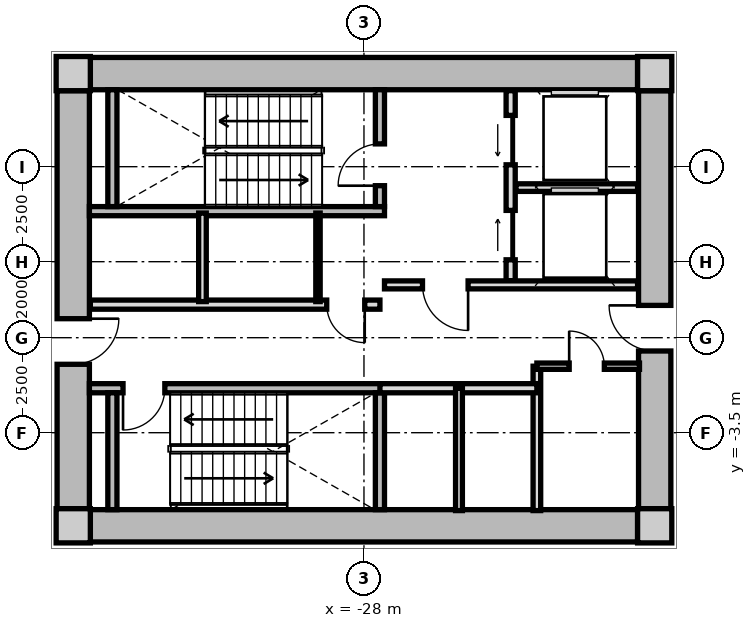
"""IFC4 building model, lengths in metres.
Left out: names, types, materials, properties, quantities, classifications, styles, units other than length and angle.
Written with IfcOpenShell. Run it as: python <this file> out.ifc"""

import sys

from ifc_helpers import new_model, si_unit, direction, frame, frame_2d, origin, origin_2d, place, context, subcontext, project, spatial, rectangle, extrude, source, transform, mapped, element, fill, save


model = new_model("IFC4")
c1 = context("Model", 3, precision=1e-05, world=origin(), true_north=direction((0.0, 1.0)))
c2 = subcontext(c1, "Body", "Model", "MODEL_VIEW")
j1 = project(units=[si_unit("LENGTHUNIT", "METRE"), si_unit("PLANEANGLEUNIT", "RADIAN")], contexts=[c1])
p1 = place(None, origin())
s1 = spatial("IfcSite", under=j1, at=p1, CompositionType="ELEMENT")
p2 = place(p1, origin())
s2 = spatial("IfcBuilding", under=s1, at=p2, CompositionType="ELEMENT")
p3 = place(p2, frame((0.0, 0.0, -4.2)))
s3 = spatial("IfcBuildingStorey", under=s2, at=p3, CompositionType="ELEMENT", Elevation=-4.2)
m1 = source(origin(), c2, "Body", "SweptSolid", [
    extrude(rectangle(XDim=0.9, YDim=0.9, at=origin_2d()), origin(), (0.0, 0.0, 1.0), 4.2),
])
for number, where, z_axis, x_axis in (
    (1, (-35.65, -5.95, 0.0), (0.0, 0.0, 1.0), (1.0, 0.0, 0.0)),
    (2, (-20.35, -5.95, 0.0), (0.0, 0.0, 1.0), (1.0, 0.0, 0.0)),
    (3, (-20.35, 5.95, 0.0), (0.0, 0.0, 1.0), (1.0, 0.0, 0.0)),
    (4, (-35.65, 5.95, 0.0), (0.0, 0.0, 1.0), (1.0, 0.0, 0.0)),
):
    element("IfcColumn", number, at=place(p3, frame(where, z_axis=z_axis, x_axis=x_axis)), inside=s3, PredefinedType="COLUMN", context=c2, shape_type="MappedRepresentation", body=[
        mapped(m1, transform((0.0, 0.0, 0.0), x_axis=(1.0, 0.0, 0.0), y_axis=(0.0, 1.0, 0.0), z_axis=(0.0, 0.0, 1.0), scale=1.0)),
    ])
m2 = source(origin(), c2, "Body", "SweptSolid", [
    extrude(rectangle(XDim=14.4, YDim=0.85, at=frame_2d((7.2, 0.0))), origin(), (0.0, 0.0, 1.0), 3.88),
])
for number, where, z_axis, x_axis in (
    (5, (-35.2, 5.95, 0.0), (0.0, 0.0, 1.0), (1.0, 0.0, 0.0)),
    (6, (-20.8, -5.95, 0.0), (0.0, 0.0, 1.0), (-1.0, 0.0, 0.0)),
):
    element("IfcWall", number, at=place(p3, frame(where, z_axis=z_axis, x_axis=x_axis)), inside=s3, PredefinedType="SHEAR", context=c2, shape_type="MappedRepresentation", body=[
        mapped(m2, transform((0.0, 0.0, 0.0), x_axis=(1.0, 0.0, 0.0), y_axis=(0.0, 1.0, 0.0), z_axis=(0.0, 0.0, 1.0), scale=1.0)),
    ])
m3 = source(origin(), c2, "Body", "SweptSolid", [
    extrude(rectangle(XDim=11.0, YDim=0.85, at=frame_2d((5.5, 0.0))), origin(), (0.0, 0.0, 1.0), 3.88),
])
p4 = place(p3, frame((-35.65, -5.5, 0.0), z_axis=(0.0, 0.0, 1.0), x_axis=(0.0, 1.0, 0.0)))
e7 = element("IfcWall", 7, at=p4, inside=s3, PredefinedType="SHEAR", context=c2, shape_type="MappedRepresentation", body=[
    mapped(m3, transform((0.0, 0.0, 0.0), x_axis=(1.0, 0.0, 0.0), y_axis=(0.0, 1.0, 0.0), z_axis=(0.0, 0.0, 1.0), scale=1.0)),
])
p5 = place(p4, frame((3.8, 0.0, 0.0)))
e8 = element("IfcOpeningElement", 8, at=p5, cuts=e7, PredefinedType="OPENING", context=c2, shape_type="SweptSolid", body=[
    extrude(rectangle(XDim=1.2, YDim=2.15, at=frame_2d((0.6, 1.075))), frame((0.0, 0.435, 0.0), z_axis=(0.0, -1.0, 0.0), x_axis=(1.0, 0.0, 0.0)), (0.0, 0.0, 1.0), 0.87),
])
p6 = place(p3, frame((-20.35, 5.5, 0.0), z_axis=(0.0, 0.0, 1.0), x_axis=(0.0, -1.0, 0.0)))
e9 = element("IfcWall", 9, at=p6, inside=s3, PredefinedType="SHEAR", context=c2, shape_type="MappedRepresentation", body=[
    mapped(m3, transform((0.0, 0.0, 0.0), x_axis=(1.0, 0.0, 0.0), y_axis=(0.0, 1.0, 0.0), z_axis=(0.0, 0.0, 1.0), scale=1.0)),
])
p7 = place(p6, frame((5.65, 0.0, 0.0)))
e10 = element("IfcOpeningElement", 10, at=p7, cuts=e9, PredefinedType="OPENING", context=c2, shape_type="SweptSolid", body=[
    extrude(rectangle(XDim=1.2, YDim=2.15, at=frame_2d((0.6, 1.075))), frame((0.0, 0.435, 0.0), z_axis=(0.0, -1.0, 0.0), x_axis=(1.0, 0.0, 0.0)), (0.0, 0.0, 1.0), 0.87),
])
m4 = source(origin(), c2, "Body", "SweptSolid", [
    extrude(rectangle(XDim=7.765, YDim=0.24, at=frame_2d((3.883, 0.0))), origin(), (0.0, 0.0, 1.0), 3.88),
])
p8 = place(p3, frame((-35.225, 2.33, 0.0), z_axis=(0.0, 0.0, 1.0), x_axis=(1.0, 0.0, 0.0)))
e11 = element("IfcWall", 11, at=p8, inside=s3, PredefinedType="PARTITIONING", context=c2, shape_type="MappedRepresentation", body=[
    mapped(m4, transform((0.0, 0.0, 0.0), x_axis=(1.0, 0.0, 0.0), y_axis=(0.0, 1.0, 0.0), z_axis=(0.0, 0.0, 1.0), scale=1.0)),
])
m5 = source(origin(), c2, "Body", "SweptSolid", [
    extrude(rectangle(XDim=3.075, YDim=0.24, at=frame_2d((1.538, 0.0))), origin(), (0.0, 0.0, 1.0), 3.88),
])
p9 = place(p3, frame((-34.62, 2.45, 0.0), z_axis=(0.0, 0.0, 1.0), x_axis=(0.0, 1.0, 0.0)))
e12 = element("IfcWall", 12, at=p9, inside=s3, PredefinedType="PARTITIONING", context=c2, shape_type="MappedRepresentation", body=[
    mapped(m5, transform((0.0, 0.0, 0.0), x_axis=(1.0, 0.0, 0.0), y_axis=(0.0, 1.0, 0.0), z_axis=(0.0, 0.0, 1.0), scale=1.0)),
])
p10 = place(p3, frame((-27.58, 2.45, 0.0), z_axis=(0.0, 0.0, 1.0), x_axis=(0.0, 1.0, 0.0)))
e13 = element("IfcWall", 13, at=p10, inside=s3, PredefinedType="PARTITIONING", context=c2, shape_type="MappedRepresentation", body=[
    mapped(m5, transform((0.0, 0.0, 0.0), x_axis=(1.0, 0.0, 0.0), y_axis=(0.0, 1.0, 0.0), z_axis=(0.0, 0.0, 1.0), scale=1.0)),
])
p11 = place(p10, frame((0.55, 0.0, 0.0)))
e14 = element("IfcOpeningElement", 14, at=p11, cuts=e13, PredefinedType="OPENING", context=c2, shape_type="SweptSolid", body=[
    extrude(rectangle(XDim=1.1, YDim=2.15, at=frame_2d((0.55, 1.075))), frame((0.0, 0.13, 0.0), z_axis=(0.0, -1.0, 0.0), x_axis=(1.0, 0.0, 0.0)), (0.0, 0.0, 1.0), 0.26),
])
p12 = place(p3, frame((-35.225, -2.33, 0.0), z_axis=(0.0, 0.0, 1.0), x_axis=(1.0, 0.0, 0.0)))
e15 = element("IfcWall", 15, at=p12, inside=s3, PredefinedType="PARTITIONING", context=c2, shape_type="MappedRepresentation", body=[
    mapped(m4, transform((0.0, 0.0, 0.0), x_axis=(1.0, 0.0, 0.0), y_axis=(0.0, 1.0, 0.0), z_axis=(0.0, 0.0, 1.0), scale=1.0)),
])
p13 = place(p12, frame((0.885, 0.0, 0.0)))
e16 = element("IfcOpeningElement", 16, at=p13, cuts=e15, PredefinedType="OPENING", context=c2, shape_type="SweptSolid", body=[
    extrude(rectangle(XDim=1.1, YDim=2.15, at=frame_2d((0.55, 1.075))), frame((0.0, 0.13, 0.0), z_axis=(0.0, -1.0, 0.0), x_axis=(1.0, 0.0, 0.0)), (0.0, 0.0, 1.0), 0.26),
])
for number, where, z_axis, x_axis in (
    (17, (-34.62, -5.525, 0.0), (0.0, 0.0, 1.0), (0.0, 1.0, 0.0)),
    (18, (-27.58, -5.525, 0.0), (0.0, 0.0, 1.0), (0.0, 1.0, 0.0)),
):
    element("IfcWall", number, at=place(p3, frame(where, z_axis=z_axis, x_axis=x_axis)), inside=s3, PredefinedType="PARTITIONING", context=c2, shape_type="MappedRepresentation", body=[
        mapped(m5, transform((0.0, 0.0, 0.0), x_axis=(1.0, 0.0, 0.0), y_axis=(0.0, 1.0, 0.0), z_axis=(0.0, 0.0, 1.0), scale=1.0)),
    ])
m6 = source(origin(), c2, "Body", "SweptSolid", [
    extrude(rectangle(XDim=5.0, YDim=0.24, at=frame_2d((2.5, 0.0))), origin(), (0.0, 0.0, 1.0), 3.865),
])
p14 = place(p3, frame((-24.14, 0.5, 0.0), z_axis=(0.0, 0.0, 1.0), x_axis=(0.0, 1.0, 0.0)))
e19 = element("IfcWall", 19, at=p14, inside=s3, PredefinedType="PARTITIONING", context=c2, shape_type="MappedRepresentation", body=[
    mapped(m6, transform((0.0, 0.0, 0.0), x_axis=(1.0, 0.0, 0.0), y_axis=(0.0, 1.0, 0.0), z_axis=(0.0, 0.0, 1.0), scale=1.0)),
])
p15 = place(p14, frame((3.05, 0.0, 0.0)))
e20 = element("IfcOpeningElement", 20, at=p15, cuts=e19, PredefinedType="OPENING", context=c2, shape_type="SweptSolid", body=[
    extrude(rectangle(XDim=1.3, YDim=2.2, at=frame_2d((0.65, 1.1))), frame((0.0, 0.13, 0.0), z_axis=(0.0, -1.0, 0.0), x_axis=(1.0, 0.0, 0.0)), (0.0, 0.0, 1.0), 0.26),
])
p16 = place(p14, frame((0.55, 0.0, 0.0)))
e21 = element("IfcOpeningElement", 21, at=p16, cuts=e19, PredefinedType="OPENING", context=c2, shape_type="SweptSolid", body=[
    extrude(rectangle(XDim=1.3, YDim=2.2, at=frame_2d((0.65, 1.1))), frame((0.0, 0.13, 0.0), z_axis=(0.0, -1.0, 0.0), x_axis=(1.0, 0.0, 0.0)), (0.0, 0.0, 1.0), 0.26),
])
m7 = source(origin(), c2, "Body", "SweptSolid", [
    extrude(rectangle(XDim=3.2, YDim=0.2, at=frame_2d((1.6, 0.0))), origin(), (0.0, 0.0, 1.0), 3.865),
])
p17 = place(p3, frame((-24.0, 2.95, 0.0), z_axis=(0.0, 0.0, 1.0), x_axis=(1.0, 0.0, 0.0)))
e22 = element("IfcWall", 22, at=p17, inside=s3, PredefinedType="PARTITIONING", context=c2, shape_type="MappedRepresentation", body=[
    mapped(m7, transform((0.0, 0.0, 0.0), x_axis=(1.0, 0.0, 0.0), y_axis=(0.0, 1.0, 0.0), z_axis=(0.0, 0.0, 1.0), scale=1.0)),
])
m8 = source(origin(), c2, "Body", "SweptSolid", [
    extrude(rectangle(XDim=6.66, YDim=0.21, at=frame_2d((3.33, 0.0))), origin(), (0.0, 0.0, 1.0), 3.865),
])
p18 = place(p3, frame((-27.46, 0.39, 0.0), z_axis=(0.0, 0.0, 1.0), x_axis=(1.0, 0.0, 0.0)))
e23 = element("IfcWall", 23, at=p18, inside=s3, PredefinedType="PARTITIONING", context=c2, shape_type="MappedRepresentation", body=[
    mapped(m8, transform((0.0, 0.0, 0.0), x_axis=(1.0, 0.0, 0.0), y_axis=(0.0, 1.0, 0.0), z_axis=(0.0, 0.0, 1.0), scale=1.0)),
])
p19 = place(p18, frame((1.0, 0.0, 0.0)))
e24 = element("IfcOpeningElement", 24, at=p19, cuts=e23, PredefinedType="OPENING", context=c2, shape_type="SweptSolid", body=[
    extrude(rectangle(XDim=1.2, YDim=2.15, at=frame_2d((0.6, 1.075))), frame((0.0, 0.115, 0.0), z_axis=(0.0, -1.0, 0.0), x_axis=(1.0, 0.0, 0.0)), (0.0, 0.0, 1.0), 0.23),
])
m9 = source(origin(), c2, "Body", "SweptSolid", [
    extrude(rectangle(XDim=7.62, YDim=0.24, at=frame_2d((3.81, 0.0))), origin(), (0.0, 0.0, 1.0), 3.865),
])
p20 = place(p3, frame((-35.2, -0.13, 0.0), z_axis=(0.0, 0.0, 1.0), x_axis=(1.0, 0.0, 0.0)))
e25 = element("IfcWall", 25, at=p20, inside=s3, PredefinedType="PARTITIONING", context=c2, shape_type="MappedRepresentation", body=[
    mapped(m9, transform((0.0, 0.0, 0.0), x_axis=(1.0, 0.0, 0.0), y_axis=(0.0, 1.0, 0.0), z_axis=(0.0, 0.0, 1.0), scale=1.0)),
])
p21 = place(p20, frame((6.22, 0.0, 0.0)))
e26 = element("IfcOpeningElement", 26, at=p21, cuts=e25, PredefinedType="OPENING", context=c2, shape_type="SweptSolid", body=[
    extrude(rectangle(XDim=1.0, YDim=2.1, at=frame_2d((0.5, 1.05))), frame((0.0, 0.13, 0.0), z_axis=(0.0, -1.0, 0.0), x_axis=(1.0, 0.0, 0.0)), (0.0, 0.0, 1.0), 0.26),
])
m10 = source(origin(), c2, "Body", "SweptSolid", [
    extrude(rectangle(XDim=2.33, YDim=0.115, at=frame_2d((1.165, 0.0))), origin(), (0.0, 0.0, 1.0), 3.865),
])
p22 = place(p3, frame((-29.21, -0.05, 0.0), z_axis=(0.0, 0.0, 1.0), x_axis=(0.0, 1.0, 0.0)))
e27 = element("IfcWall", 27, at=p22, inside=s3, PredefinedType="PARTITIONING", context=c2, shape_type="MappedRepresentation", body=[
    mapped(m10, transform((0.0, 0.0, 0.0), x_axis=(1.0, 0.0, 0.0), y_axis=(0.0, 1.0, 0.0), z_axis=(0.0, 0.0, 1.0), scale=1.0)),
])
m11 = source(origin(), c2, "Body", "SweptSolid", [
    extrude(rectangle(XDim=2.33, YDim=0.2, at=frame_2d((1.165, 0.0))), origin(), (0.0, 0.0, 1.0), 3.865),
])
p23 = place(p3, frame((-32.25, -0.05, 0.0), z_axis=(0.0, 0.0, 1.0), x_axis=(0.0, 1.0, 0.0)))
e28 = element("IfcWall", 28, at=p23, inside=s3, PredefinedType="PARTITIONING", context=c2, shape_type="MappedRepresentation", body=[
    mapped(m11, transform((0.0, 0.0, 0.0), x_axis=(1.0, 0.0, 0.0), y_axis=(0.0, 1.0, 0.0), z_axis=(0.0, 0.0, 1.0), scale=1.0)),
])
m12 = source(origin(), c2, "Body", "SweptSolid", [
    extrude(rectangle(XDim=3.8, YDim=0.2, at=frame_2d((1.9, 0.0))), origin(), (0.0, 0.0, 1.0), 3.865),
])
p24 = place(p3, frame((-23.45, -5.55, 0.0), z_axis=(0.0, 0.0, 1.0), x_axis=(0.0, 1.0, 0.0)))
e29 = element("IfcWall", 29, at=p24, inside=s3, PredefinedType="PARTITIONING", context=c2, shape_type="MappedRepresentation", body=[
    mapped(m12, transform((0.0, 0.0, 0.0), x_axis=(1.0, 0.0, 0.0), y_axis=(0.0, 1.0, 0.0), z_axis=(0.0, 0.0, 1.0), scale=1.0)),
])
m13 = source(origin(), c2, "Body", "SweptSolid", [
    extrude(rectangle(XDim=4.13, YDim=0.24, at=frame_2d((2.065, 0.0))), origin(), (0.0, 0.0, 1.0), 3.865),
])
p25 = place(p3, frame((-27.58, -2.33, 0.0), z_axis=(0.0, 0.0, 1.0), x_axis=(1.0, 0.0, 0.0)))
e30 = element("IfcWall", 30, at=p25, inside=s3, PredefinedType="PARTITIONING", context=c2, shape_type="MappedRepresentation", body=[
    mapped(m13, transform((0.0, 0.0, 0.0), x_axis=(1.0, 0.0, 0.0), y_axis=(0.0, 1.0, 0.0), z_axis=(0.0, 0.0, 1.0), scale=1.0)),
])
m14 = source(origin(), c2, "Body", "SweptSolid", [
    extrude(rectangle(XDim=3.22, YDim=0.18, at=frame_2d((1.61, 0.0))), origin(), (0.0, 0.0, 1.0), 3.865),
])
p26 = place(p3, frame((-25.5, -5.55, 0.0), z_axis=(0.0, 0.0, 1.0), x_axis=(0.0, 1.0, 0.0)))
e31 = element("IfcWall", 31, at=p26, inside=s3, PredefinedType="PARTITIONING", context=c2, shape_type="MappedRepresentation", body=[
    mapped(m14, transform((0.0, 0.0, 0.0), x_axis=(1.0, 0.0, 0.0), y_axis=(0.0, 1.0, 0.0), z_axis=(0.0, 0.0, 1.0), scale=1.0)),
])
m15 = source(origin(), c2, "Body", "SweptSolid", [
    extrude(rectangle(XDim=2.7, YDim=0.165, at=frame_2d((1.35, 0.0))), origin(), (0.0, 0.0, 1.0), 3.865),
])
p27 = place(p3, frame((-23.45, -1.75, 0.0), z_axis=(0.0, 0.0, 1.0), x_axis=(1.0, 0.0, 0.0)))
e32 = element("IfcWall", 32, at=p27, inside=s3, PredefinedType="PARTITIONING", context=c2, shape_type="MappedRepresentation", body=[
    mapped(m15, transform((0.0, 0.0, 0.0), x_axis=(1.0, 0.0, 0.0), y_axis=(0.0, 1.0, 0.0), z_axis=(0.0, 0.0, 1.0), scale=1.0)),
])
p28 = place(p27, frame((0.85, 0.0, 0.0)))
e33 = element("IfcOpeningElement", 33, at=p28, cuts=e32, PredefinedType="OPENING", context=c2, shape_type="SweptSolid", body=[
    extrude(rectangle(XDim=0.925, YDim=2.1, at=frame_2d((0.462, 1.05))), frame((0.0, 0.093, 0.0), z_axis=(0.0, -1.0, 0.0), x_axis=(1.0, 0.0, 0.0)), (0.0, 0.0, 1.0), 0.185),
])
m16 = source(origin(), c2, "Body", "SweptSolid", [
    extrude(rectangle(XDim=1.1, YDim=2.15, at=frame_2d((0.55, 1.075))), frame((0.0, 0.025, 0.0), z_axis=(0.0, -1.0, 0.0), x_axis=(1.0, 0.0, 0.0)), (0.0, 0.0, 1.0), 0.05),
])
p29 = place(p11, origin())
e34 = element("IfcDoor", 34, at=p29, inside=s3, OperationType="SINGLE_SWING_LEFT", PredefinedType="DOOR", context=c2, shape_type="MappedRepresentation", body=[
    mapped(m16, transform((0.0, 0.0, 0.0), x_axis=(1.0, 0.0, 0.0), y_axis=(0.0, 1.0, 0.0), z_axis=(0.0, 0.0, 1.0), scale=1.0)),
])
fill(e14, e34)
p30 = place(p13, frame((1.1, 0.0, 0.0), z_axis=(0.0, 0.0, 1.0), x_axis=(-1.0, 0.0, 0.0)))
e35 = element("IfcDoor", 35, at=p30, inside=s3, OperationType="SINGLE_SWING_RIGHT", PredefinedType="DOOR", context=c2, shape_type="MappedRepresentation", body=[
    mapped(m16, transform((0.0, 0.0, 0.0), x_axis=(1.0, 0.0, 0.0), y_axis=(0.0, 1.0, 0.0), z_axis=(0.0, 0.0, 1.0), scale=1.0)),
])
fill(e16, e35)
m17 = source(origin(), c2, "Body", "SweptSolid", [
    extrude(rectangle(XDim=1.3, YDim=2.2, at=frame_2d((0.65, 1.1))), frame((0.0, 0.025, 0.0), z_axis=(0.0, -1.0, 0.0), x_axis=(1.0, 0.0, 0.0)), (0.0, 0.0, 1.0), 0.05),
])
p31 = place(p15, origin())
e36 = element("IfcDoor", 36, at=p31, inside=s3, OperationType="SLIDING_TO_LEFT", PredefinedType="DOOR", context=c2, shape_type="MappedRepresentation", body=[
    mapped(m17, transform((0.0, 0.0, 0.0), x_axis=(1.0, 0.0, 0.0), y_axis=(0.0, 1.0, 0.0), z_axis=(0.0, 0.0, 1.0), scale=1.0)),
])
fill(e20, e36)
p32 = place(p16, origin())
e37 = element("IfcDoor", 37, at=p32, inside=s3, OperationType="SLIDING_TO_RIGHT", PredefinedType="DOOR", context=c2, shape_type="MappedRepresentation", body=[
    mapped(m17, transform((0.0, 0.0, 0.0), x_axis=(1.0, 0.0, 0.0), y_axis=(0.0, 1.0, 0.0), z_axis=(0.0, 0.0, 1.0), scale=1.0)),
])
fill(e21, e37)
m18 = source(origin(), c2, "Body", "SweptSolid", [
    extrude(rectangle(XDim=1.2, YDim=2.15, at=frame_2d((0.6, 1.075))), frame((0.0, 0.025, 0.0), z_axis=(0.0, -1.0, 0.0), x_axis=(1.0, 0.0, 0.0)), (0.0, 0.0, 1.0), 0.05),
])
p33 = place(p19, frame((1.2, 0.0, 0.0), z_axis=(0.0, 0.0, 1.0), x_axis=(-1.0, 0.0, 0.0)))
e38 = element("IfcDoor", 38, at=p33, inside=s3, OperationType="SINGLE_SWING_LEFT", PredefinedType="DOOR", context=c2, shape_type="MappedRepresentation", body=[
    mapped(m18, transform((0.0, 0.0, 0.0), x_axis=(1.0, 0.0, 0.0), y_axis=(0.0, 1.0, 0.0), z_axis=(0.0, 0.0, 1.0), scale=1.0)),
])
fill(e24, e38)
p34 = place(p5, frame((1.2, 0.0, 0.0), z_axis=(0.0, 0.0, 1.0), x_axis=(-1.0, 0.0, 0.0)))
e39 = element("IfcDoor", 39, at=p34, inside=s3, OperationType="SINGLE_SWING_LEFT", PredefinedType="DOOR", context=c2, shape_type="MappedRepresentation", body=[
    mapped(m18, transform((0.0, 0.0, 0.0), x_axis=(1.0, 0.0, 0.0), y_axis=(0.0, 1.0, 0.0), z_axis=(0.0, 0.0, 1.0), scale=1.0)),
])
fill(e8, e39)
p35 = place(p7, frame((1.2, 0.0, 0.0), z_axis=(0.0, 0.0, 1.0), x_axis=(-1.0, 0.0, 0.0)))
e40 = element("IfcDoor", 40, at=p35, inside=s3, OperationType="SINGLE_SWING_RIGHT", PredefinedType="DOOR", context=c2, shape_type="MappedRepresentation", body=[
    mapped(m18, transform((0.0, 0.0, 0.0), x_axis=(1.0, 0.0, 0.0), y_axis=(0.0, 1.0, 0.0), z_axis=(0.0, 0.0, 1.0), scale=1.0)),
])
fill(e10, e40)
m19 = source(origin(), c2, "Body", "SweptSolid", [
    extrude(rectangle(XDim=1.0, YDim=2.1, at=frame_2d((0.5, 1.05))), frame((0.0, 0.025, 0.0), z_axis=(0.0, -1.0, 0.0), x_axis=(1.0, 0.0, 0.0)), (0.0, 0.0, 1.0), 0.05),
])
p36 = place(p21, frame((1.0, 0.0, 0.0), z_axis=(0.0, 0.0, 1.0), x_axis=(-1.0, 0.0, 0.0)))
e41 = element("IfcDoor", 41, at=p36, inside=s3, OperationType="SINGLE_SWING_LEFT", PredefinedType="DOOR", context=c2, shape_type="MappedRepresentation", body=[
    mapped(m19, transform((0.0, 0.0, 0.0), x_axis=(1.0, 0.0, 0.0), y_axis=(0.0, 1.0, 0.0), z_axis=(0.0, 0.0, 1.0), scale=1.0)),
])
fill(e26, e41)
m20 = source(origin(), c2, "Body", "SweptSolid", [
    extrude(rectangle(XDim=0.925, YDim=2.1, at=frame_2d((0.462, 1.05))), frame((0.0, 0.025, 0.0), z_axis=(0.0, -1.0, 0.0), x_axis=(1.0, 0.0, 0.0)), (0.0, 0.0, 1.0), 0.05),
])
p37 = place(p28, origin())
e42 = element("IfcDoor", 42, at=p37, inside=s3, OperationType="SINGLE_SWING_LEFT", PredefinedType="DOOR", context=c2, shape_type="MappedRepresentation", body=[
    mapped(m20, transform((0.0, 0.0, 0.0), x_axis=(1.0, 0.0, 0.0), y_axis=(0.0, 1.0, 0.0), z_axis=(0.0, 0.0, 1.0), scale=1.0)),
])
fill(e33, e42)
save(model, sys.argv[1])
